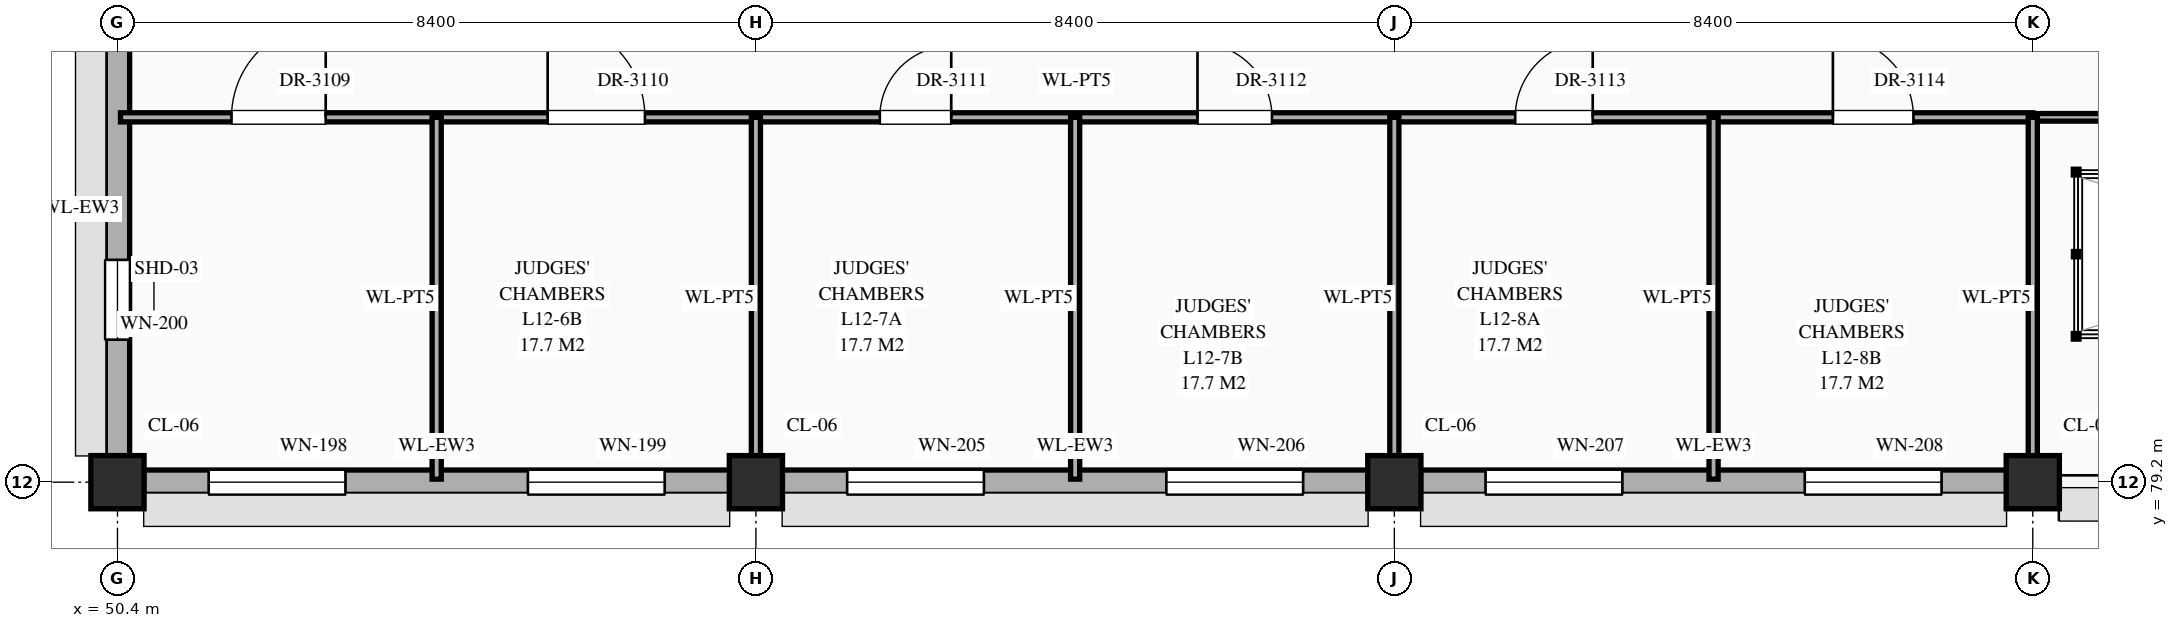
"""IFC4 building model, lengths in metres.
Left out: names, types, materials, properties, quantities, classifications, styles, units other than length and angle.
Written with IfcOpenShell. Run it as: python <this file> out.ifc"""

import sys

from ifc_helpers import new_model, si_unit, direction, frame, frame_2d, origin, origin_2d, place, context, subcontext, project, spatial, rectangle, extrude, element, fill, save


model = new_model("IFC4")
c1 = context("Model", 3, precision=1e-05, world=origin(), true_north=direction((0.0, 1.0)))
c2 = subcontext(c1, "Body", "Model", "MODEL_VIEW")
j1 = project(units=[si_unit("LENGTHUNIT", "METRE"), si_unit("PLANEANGLEUNIT", "RADIAN")], contexts=[c1])
p1 = place(None, origin())
s1 = spatial("IfcSite", under=j1, at=p1, CompositionType="ELEMENT")
p2 = place(p1, origin())
s2 = spatial("IfcBuilding", under=s1, at=p2, CompositionType="ELEMENT")
p3 = place(p2, frame((0.0, 0.0, 51.9)))
s3 = spatial("IfcBuildingStorey", under=s2, at=p3, CompositionType="ELEMENT", Elevation=51.9)
for number, where, z_axis, x_axis in (
    (1, (50.4, 79.2, 0.0), (0.0, 0.0, 1.0), (1.0, 0.0, 0.0)),
    (2, (58.8, 79.2, 0.0), (0.0, 0.0, 1.0), (1.0, 0.0, 0.0)),
    (3, (67.2, 79.2, 0.0), (0.0, 0.0, 1.0), (1.0, 0.0, 0.0)),
    (4, (75.6, 79.2, 0.0), (0.0, 0.0, 1.0), (1.0, 0.0, 0.0)),
):
    element("IfcColumn", number, at=place(p3, frame(where, z_axis=z_axis, x_axis=x_axis)), inside=s3, PredefinedType="COLUMN", context=c2, shape_type="SweptSolid", body=[
        extrude(rectangle(XDim=0.7, YDim=0.7, at=origin_2d()), origin(), (0.0, 0.0, 1.0), 4.2),
    ])
p4 = place(p3, frame((50.745, 79.2, 0.0), z_axis=(0.0, 0.0, 1.0), x_axis=(1.0, 0.0, 0.0)))
e5 = element("IfcWall", 5, at=p4, inside=s3, PredefinedType="STANDARD", context=c2, shape_type="SweptSolid", body=[
    extrude(rectangle(XDim=7.71, YDim=0.32, at=frame_2d((3.855, 0.0))), origin(), (0.0, 0.0, 1.0), 3.31),
])
p5 = place(p4, frame((0.855, 0.0, 0.55)))
e6 = element("IfcOpeningElement", 6, at=p5, cuts=e5, PredefinedType="OPENING", context=c2, shape_type="SweptSolid", body=[
    extrude(rectangle(XDim=1.8, YDim=2.12, at=frame_2d((0.9, 1.06))), frame((0.0, 0.172, 0.0), z_axis=(0.0, -1.0, 0.0), x_axis=(1.0, 0.0, 0.0)), (0.0, 0.0, 1.0), 0.344),
])
p6 = place(p4, frame((5.055, 0.0, 0.55)))
e7 = element("IfcOpeningElement", 7, at=p6, cuts=e5, PredefinedType="OPENING", context=c2, shape_type="SweptSolid", body=[
    extrude(rectangle(XDim=1.8, YDim=2.12, at=frame_2d((0.9, 1.06))), frame((0.0, 0.172, 0.0), z_axis=(0.0, -1.0, 0.0), x_axis=(1.0, 0.0, 0.0)), (0.0, 0.0, 1.0), 0.344),
])
p7 = place(p3, frame((50.4, 79.545, 0.0), z_axis=(0.0, 0.0, 1.0), x_axis=(0.0, 1.0, 0.0)))
e8 = element("IfcWall", 8, at=p7, inside=s3, PredefinedType="STANDARD", context=c2, shape_type="SweptSolid", body=[
    extrude(rectangle(XDim=6.51, YDim=0.32, at=frame_2d((3.255, 0.0))), origin(), (0.0, 0.0, 1.0), 3.31),
])
p8 = place(p7, frame((1.53, 0.0, 0.55)))
e9 = element("IfcOpeningElement", 9, at=p8, cuts=e8, PredefinedType="OPENING", context=c2, shape_type="SweptSolid", body=[
    extrude(rectangle(XDim=1.05, YDim=1.74, at=frame_2d((0.525, 0.87))), frame((0.0, 0.172, 0.0), z_axis=(0.0, -1.0, 0.0), x_axis=(1.0, 0.0, 0.0)), (0.0, 0.0, 1.0), 0.344),
])
p9 = place(p3, frame((59.145, 79.2, 0.0), z_axis=(0.0, 0.0, 1.0), x_axis=(1.0, 0.0, 0.0)))
e10 = element("IfcWall", 10, at=p9, inside=s3, PredefinedType="STANDARD", context=c2, shape_type="SweptSolid", body=[
    extrude(rectangle(XDim=7.71, YDim=0.32, at=frame_2d((3.855, 0.0))), origin(), (0.0, 0.0, 1.0), 3.31),
])
p10 = place(p9, frame((0.855, 0.0, 0.55)))
e11 = element("IfcOpeningElement", 11, at=p10, cuts=e10, PredefinedType="OPENING", context=c2, shape_type="SweptSolid", body=[
    extrude(rectangle(XDim=1.8, YDim=2.12, at=frame_2d((0.9, 1.06))), frame((0.0, 0.172, 0.0), z_axis=(0.0, -1.0, 0.0), x_axis=(1.0, 0.0, 0.0)), (0.0, 0.0, 1.0), 0.344),
])
p11 = place(p9, frame((5.055, 0.0, 0.55)))
e12 = element("IfcOpeningElement", 12, at=p11, cuts=e10, PredefinedType="OPENING", context=c2, shape_type="SweptSolid", body=[
    extrude(rectangle(XDim=1.8, YDim=2.12, at=frame_2d((0.9, 1.06))), frame((0.0, 0.172, 0.0), z_axis=(0.0, -1.0, 0.0), x_axis=(1.0, 0.0, 0.0)), (0.0, 0.0, 1.0), 0.344),
])
p12 = place(p3, frame((67.545, 79.2, 0.0), z_axis=(0.0, 0.0, 1.0), x_axis=(1.0, 0.0, 0.0)))
e13 = element("IfcWall", 13, at=p12, inside=s3, PredefinedType="STANDARD", context=c2, shape_type="SweptSolid", body=[
    extrude(rectangle(XDim=7.71, YDim=0.32, at=frame_2d((3.855, 0.0))), origin(), (0.0, 0.0, 1.0), 3.31),
])
p13 = place(p12, frame((0.855, 0.0, 0.55)))
e14 = element("IfcOpeningElement", 14, at=p13, cuts=e13, PredefinedType="OPENING", context=c2, shape_type="SweptSolid", body=[
    extrude(rectangle(XDim=1.8, YDim=2.12, at=frame_2d((0.9, 1.06))), frame((0.0, 0.172, 0.0), z_axis=(0.0, -1.0, 0.0), x_axis=(1.0, 0.0, 0.0)), (0.0, 0.0, 1.0), 0.344),
])
p14 = place(p12, frame((5.055, 0.0, 0.55)))
e15 = element("IfcOpeningElement", 15, at=p14, cuts=e13, PredefinedType="OPENING", context=c2, shape_type="SweptSolid", body=[
    extrude(rectangle(XDim=1.8, YDim=2.12, at=frame_2d((0.9, 1.06))), frame((0.0, 0.172, 0.0), z_axis=(0.0, -1.0, 0.0), x_axis=(1.0, 0.0, 0.0)), (0.0, 0.0, 1.0), 0.344),
])
p15 = place(p3, frame((50.44, 84.0, 0.0), z_axis=(0.0, 0.0, 1.0), x_axis=(1.0, 0.0, 0.0)))
e16 = element("IfcWall", 16, at=p15, inside=s3, PredefinedType="STANDARD", context=c2, shape_type="SweptSolid", body=[
    extrude(rectangle(XDim=25.16, YDim=0.12, at=frame_2d((12.58, 0.0))), origin(), (0.0, 0.0, 1.0), 3.96),
])
p16 = place(p15, frame((1.46, 0.0, 0.0)))
e17 = element("IfcOpeningElement", 17, at=p16, cuts=e16, PredefinedType="OPENING", context=c2, shape_type="SweptSolid", body=[
    extrude(rectangle(XDim=1.24, YDim=2.3, at=frame_2d((0.62, 1.15))), frame((0.0, 0.072, 0.0), z_axis=(0.0, -1.0, 0.0), x_axis=(1.0, 0.0, 0.0)), (0.0, 0.0, 1.0), 0.144),
])
p17 = place(p15, frame((5.62, 0.0, 0.0)))
e18 = element("IfcOpeningElement", 18, at=p17, cuts=e16, PredefinedType="OPENING", context=c2, shape_type="SweptSolid", body=[
    extrude(rectangle(XDim=1.28, YDim=2.35, at=frame_2d((0.64, 1.175))), frame((0.0, 0.072, 0.0), z_axis=(0.0, -1.0, 0.0), x_axis=(1.0, 0.0, 0.0)), (0.0, 0.0, 1.0), 0.144),
])
p18 = place(p15, frame((9.99, 0.0, 0.0)))
e19 = element("IfcOpeningElement", 19, at=p18, cuts=e16, PredefinedType="OPENING", context=c2, shape_type="SweptSolid", body=[
    extrude(rectangle(XDim=0.94, YDim=2.3, at=frame_2d((0.47, 1.15))), frame((0.0, 0.072, 0.0), z_axis=(0.0, -1.0, 0.0), x_axis=(1.0, 0.0, 0.0)), (0.0, 0.0, 1.0), 0.144),
])
p19 = place(p15, frame((14.17, 0.0, 0.0)))
e20 = element("IfcOpeningElement", 20, at=p19, cuts=e16, PredefinedType="OPENING", context=c2, shape_type="SweptSolid", body=[
    extrude(rectangle(XDim=0.98, YDim=2.35, at=frame_2d((0.49, 1.175))), frame((0.0, 0.072, 0.0), z_axis=(0.0, -1.0, 0.0), x_axis=(1.0, 0.0, 0.0)), (0.0, 0.0, 1.0), 0.144),
])
p20 = place(p15, frame((18.35, 0.0, 0.0)))
e21 = element("IfcOpeningElement", 21, at=p20, cuts=e16, PredefinedType="OPENING", context=c2, shape_type="SweptSolid", body=[
    extrude(rectangle(XDim=1.02, YDim=2.4, at=frame_2d((0.51, 1.2))), frame((0.0, 0.072, 0.0), z_axis=(0.0, -1.0, 0.0), x_axis=(1.0, 0.0, 0.0)), (0.0, 0.0, 1.0), 0.144),
])
p21 = place(p15, frame((22.53, 0.0, 0.0)))
e22 = element("IfcOpeningElement", 22, at=p21, cuts=e16, PredefinedType="OPENING", context=c2, shape_type="SweptSolid", body=[
    extrude(rectangle(XDim=1.06, YDim=2.4, at=frame_2d((0.53, 1.2))), frame((0.0, 0.072, 0.0), z_axis=(0.0, -1.0, 0.0), x_axis=(1.0, 0.0, 0.0)), (0.0, 0.0, 1.0), 0.144),
])
p22 = place(p3, frame((75.6, 84.0, 0.0), z_axis=(0.0, 0.0, 1.0), x_axis=(1.0, 0.0, 0.0)))
e23 = element("IfcWall", 23, at=p22, inside=s3, PredefinedType="STANDARD", context=c2, shape_type="SweptSolid", body=[
    extrude(rectangle(XDim=16.8, YDim=0.1, at=frame_2d((8.4, 0.0))), origin(), (0.0, 0.0, 1.0), 3.96),
])
p23 = place(p22, frame((3.63, 0.0, 0.0)))
e24 = element("IfcOpeningElement", 24, at=p23, cuts=e23, PredefinedType="OPENING", context=c2, shape_type="SweptSolid", body=[
    extrude(rectangle(XDim=1.14, YDim=2.4, at=frame_2d((0.57, 1.2))), frame((0.0, 0.062, 0.0), z_axis=(0.0, -1.0, 0.0), x_axis=(1.0, 0.0, 0.0)), (0.0, 0.0, 1.0), 0.124),
])
p24 = place(p22, frame((12.15, 0.0, 0.0)))
e25 = element("IfcOpeningElement", 25, at=p24, cuts=e23, PredefinedType="OPENING", context=c2, shape_type="SweptSolid", body=[
    extrude(rectangle(XDim=0.9, YDim=2.15, at=frame_2d((0.45, 1.075))), frame((0.0, 0.062, 0.0), z_axis=(0.0, -1.0, 0.0), x_axis=(1.0, 0.0, 0.0)), (0.0, 0.0, 1.0), 0.124),
])
p25 = place(p3, frame((54.6, 79.24, 0.0), z_axis=(0.0, 0.0, 1.0), x_axis=(0.0, 1.0, 0.0)))
e26 = element("IfcWall", 26, at=p25, inside=s3, PredefinedType="STANDARD", context=c2, shape_type="SweptSolid", body=[
    extrude(rectangle(XDim=4.76, YDim=0.12, at=frame_2d((2.38, 0.0))), origin(), (0.0, 0.0, 1.0), 3.96),
])
p26 = place(p3, frame((58.8, 79.24, 0.0), z_axis=(0.0, 0.0, 1.0), x_axis=(0.0, 1.0, 0.0)))
e27 = element("IfcWall", 27, at=p26, inside=s3, PredefinedType="STANDARD", context=c2, shape_type="SweptSolid", body=[
    extrude(rectangle(XDim=4.76, YDim=0.12, at=frame_2d((2.38, 0.0))), origin(), (0.0, 0.0, 1.0), 3.21),
])
p27 = place(p3, frame((63.0, 79.24, 0.0), z_axis=(0.0, 0.0, 1.0), x_axis=(0.0, 1.0, 0.0)))
e28 = element("IfcWall", 28, at=p27, inside=s3, PredefinedType="STANDARD", context=c2, shape_type="SweptSolid", body=[
    extrude(rectangle(XDim=4.76, YDim=0.12, at=frame_2d((2.38, 0.0))), origin(), (0.0, 0.0, 1.0), 3.61),
])
p28 = place(p3, frame((67.2, 79.24, 0.0), z_axis=(0.0, 0.0, 1.0), x_axis=(0.0, 1.0, 0.0)))
e29 = element("IfcWall", 29, at=p28, inside=s3, PredefinedType="STANDARD", context=c2, shape_type="SweptSolid", body=[
    extrude(rectangle(XDim=4.76, YDim=0.12, at=frame_2d((2.38, 0.0))), origin(), (0.0, 0.0, 1.0), 3.21),
])
p29 = place(p3, frame((71.4, 79.24, 0.0), z_axis=(0.0, 0.0, 1.0), x_axis=(0.0, 1.0, 0.0)))
e30 = element("IfcWall", 30, at=p29, inside=s3, PredefinedType="STANDARD", context=c2, shape_type="SweptSolid", body=[
    extrude(rectangle(XDim=4.76, YDim=0.12, at=frame_2d((2.38, 0.0))), origin(), (0.0, 0.0, 1.0), 3.96),
])
p30 = place(p3, frame((75.6, 79.24, 0.0), z_axis=(0.0, 0.0, 1.0), x_axis=(0.0, 1.0, 0.0)))
e31 = element("IfcWall", 31, at=p30, inside=s3, PredefinedType="STANDARD", context=c2, shape_type="SweptSolid", body=[
    extrude(rectangle(XDim=4.76, YDim=0.12, at=frame_2d((2.38, 0.0))), origin(), (0.0, 0.0, 1.0), 3.21),
])
p31 = place(p5, origin())
e32 = element("IfcWindow", 32, at=p31, inside=s3, PartitioningType="SINGLE_PANEL", PredefinedType="WINDOW", context=c2, shape_type="SweptSolid", body=[
    extrude(rectangle(XDim=1.8, YDim=2.12, at=frame_2d((0.9, 1.06))), frame((0.0, 0.03, 0.0), z_axis=(0.0, -1.0, 0.0), x_axis=(1.0, 0.0, 0.0)), (0.0, 0.0, 1.0), 0.06),
])
fill(e6, e32)
p32 = place(p6, origin())
e33 = element("IfcWindow", 33, at=p32, inside=s3, PartitioningType="SINGLE_PANEL", PredefinedType="WINDOW", context=c2, shape_type="SweptSolid", body=[
    extrude(rectangle(XDim=1.8, YDim=2.12, at=frame_2d((0.9, 1.06))), frame((0.0, 0.03, 0.0), z_axis=(0.0, -1.0, 0.0), x_axis=(1.0, 0.0, 0.0)), (0.0, 0.0, 1.0), 0.06),
])
fill(e7, e33)
p33 = place(p8, origin())
e34 = element("IfcWindow", 34, at=p33, inside=s3, PartitioningType="SINGLE_PANEL", PredefinedType="WINDOW", context=c2, shape_type="SweptSolid", body=[
    extrude(rectangle(XDim=1.05, YDim=1.74, at=frame_2d((0.525, 0.87))), frame((0.0, 0.03, 0.0), z_axis=(0.0, -1.0, 0.0), x_axis=(1.0, 0.0, 0.0)), (0.0, 0.0, 1.0), 0.06),
])
fill(e9, e34)
p34 = place(p10, origin())
e35 = element("IfcWindow", 35, at=p34, inside=s3, PartitioningType="SINGLE_PANEL", PredefinedType="WINDOW", context=c2, shape_type="SweptSolid", body=[
    extrude(rectangle(XDim=1.8, YDim=2.12, at=frame_2d((0.9, 1.06))), frame((0.0, 0.03, 0.0), z_axis=(0.0, -1.0, 0.0), x_axis=(1.0, 0.0, 0.0)), (0.0, 0.0, 1.0), 0.06),
])
fill(e11, e35)
p35 = place(p11, origin())
e36 = element("IfcWindow", 36, at=p35, inside=s3, PartitioningType="SINGLE_PANEL", PredefinedType="WINDOW", context=c2, shape_type="SweptSolid", body=[
    extrude(rectangle(XDim=1.8, YDim=2.12, at=frame_2d((0.9, 1.06))), frame((0.0, 0.03, 0.0), z_axis=(0.0, -1.0, 0.0), x_axis=(1.0, 0.0, 0.0)), (0.0, 0.0, 1.0), 0.06),
])
fill(e12, e36)
p36 = place(p13, origin())
e37 = element("IfcWindow", 37, at=p36, inside=s3, PartitioningType="SINGLE_PANEL", PredefinedType="WINDOW", context=c2, shape_type="SweptSolid", body=[
    extrude(rectangle(XDim=1.8, YDim=2.12, at=frame_2d((0.9, 1.06))), frame((0.0, 0.03, 0.0), z_axis=(0.0, -1.0, 0.0), x_axis=(1.0, 0.0, 0.0)), (0.0, 0.0, 1.0), 0.06),
])
fill(e14, e37)
p37 = place(p14, origin())
e38 = element("IfcWindow", 38, at=p37, inside=s3, PartitioningType="SINGLE_PANEL", PredefinedType="WINDOW", context=c2, shape_type="SweptSolid", body=[
    extrude(rectangle(XDim=1.8, YDim=2.12, at=frame_2d((0.9, 1.06))), frame((0.0, 0.03, 0.0), z_axis=(0.0, -1.0, 0.0), x_axis=(1.0, 0.0, 0.0)), (0.0, 0.0, 1.0), 0.06),
])
fill(e15, e38)
p38 = place(p16, origin())
e39 = element("IfcDoor", 39, at=p38, inside=s3, OperationType="SINGLE_SWING_RIGHT", PredefinedType="DOOR", context=c2, shape_type="SweptSolid", body=[
    extrude(rectangle(XDim=1.24, YDim=2.3, at=frame_2d((0.62, 1.15))), frame((0.0, 0.025, 0.0), z_axis=(0.0, -1.0, 0.0), x_axis=(1.0, 0.0, 0.0)), (0.0, 0.0, 1.0), 0.05),
])
fill(e17, e39)
p39 = place(p17, origin())
e40 = element("IfcDoor", 40, at=p39, inside=s3, OperationType="SINGLE_SWING_LEFT", PredefinedType="DOOR", context=c2, shape_type="SweptSolid", body=[
    extrude(rectangle(XDim=1.28, YDim=2.35, at=frame_2d((0.64, 1.175))), frame((0.0, 0.025, 0.0), z_axis=(0.0, -1.0, 0.0), x_axis=(1.0, 0.0, 0.0)), (0.0, 0.0, 1.0), 0.05),
])
fill(e18, e40)
p40 = place(p18, origin())
e41 = element("IfcDoor", 41, at=p40, inside=s3, OperationType="SINGLE_SWING_RIGHT", PredefinedType="DOOR", context=c2, shape_type="SweptSolid", body=[
    extrude(rectangle(XDim=0.94, YDim=2.3, at=frame_2d((0.47, 1.15))), frame((0.0, 0.025, 0.0), z_axis=(0.0, -1.0, 0.0), x_axis=(1.0, 0.0, 0.0)), (0.0, 0.0, 1.0), 0.05),
])
fill(e19, e41)
p41 = place(p19, origin())
e42 = element("IfcDoor", 42, at=p41, inside=s3, OperationType="SINGLE_SWING_LEFT", PredefinedType="DOOR", context=c2, shape_type="SweptSolid", body=[
    extrude(rectangle(XDim=0.98, YDim=2.35, at=frame_2d((0.49, 1.175))), frame((0.0, 0.025, 0.0), z_axis=(0.0, -1.0, 0.0), x_axis=(1.0, 0.0, 0.0)), (0.0, 0.0, 1.0), 0.05),
])
fill(e20, e42)
p42 = place(p20, origin())
e43 = element("IfcDoor", 43, at=p42, inside=s3, OperationType="SINGLE_SWING_RIGHT", PredefinedType="DOOR", context=c2, shape_type="SweptSolid", body=[
    extrude(rectangle(XDim=1.02, YDim=2.4, at=frame_2d((0.51, 1.2))), frame((0.0, 0.025, 0.0), z_axis=(0.0, -1.0, 0.0), x_axis=(1.0, 0.0, 0.0)), (0.0, 0.0, 1.0), 0.05),
])
fill(e21, e43)
p43 = place(p21, origin())
e44 = element("IfcDoor", 44, at=p43, inside=s3, OperationType="SINGLE_SWING_LEFT", PredefinedType="DOOR", context=c2, shape_type="SweptSolid", body=[
    extrude(rectangle(XDim=1.06, YDim=2.4, at=frame_2d((0.53, 1.2))), frame((0.0, 0.025, 0.0), z_axis=(0.0, -1.0, 0.0), x_axis=(1.0, 0.0, 0.0)), (0.0, 0.0, 1.0), 0.05),
])
fill(e22, e44)
save(model, sys.argv[1])
